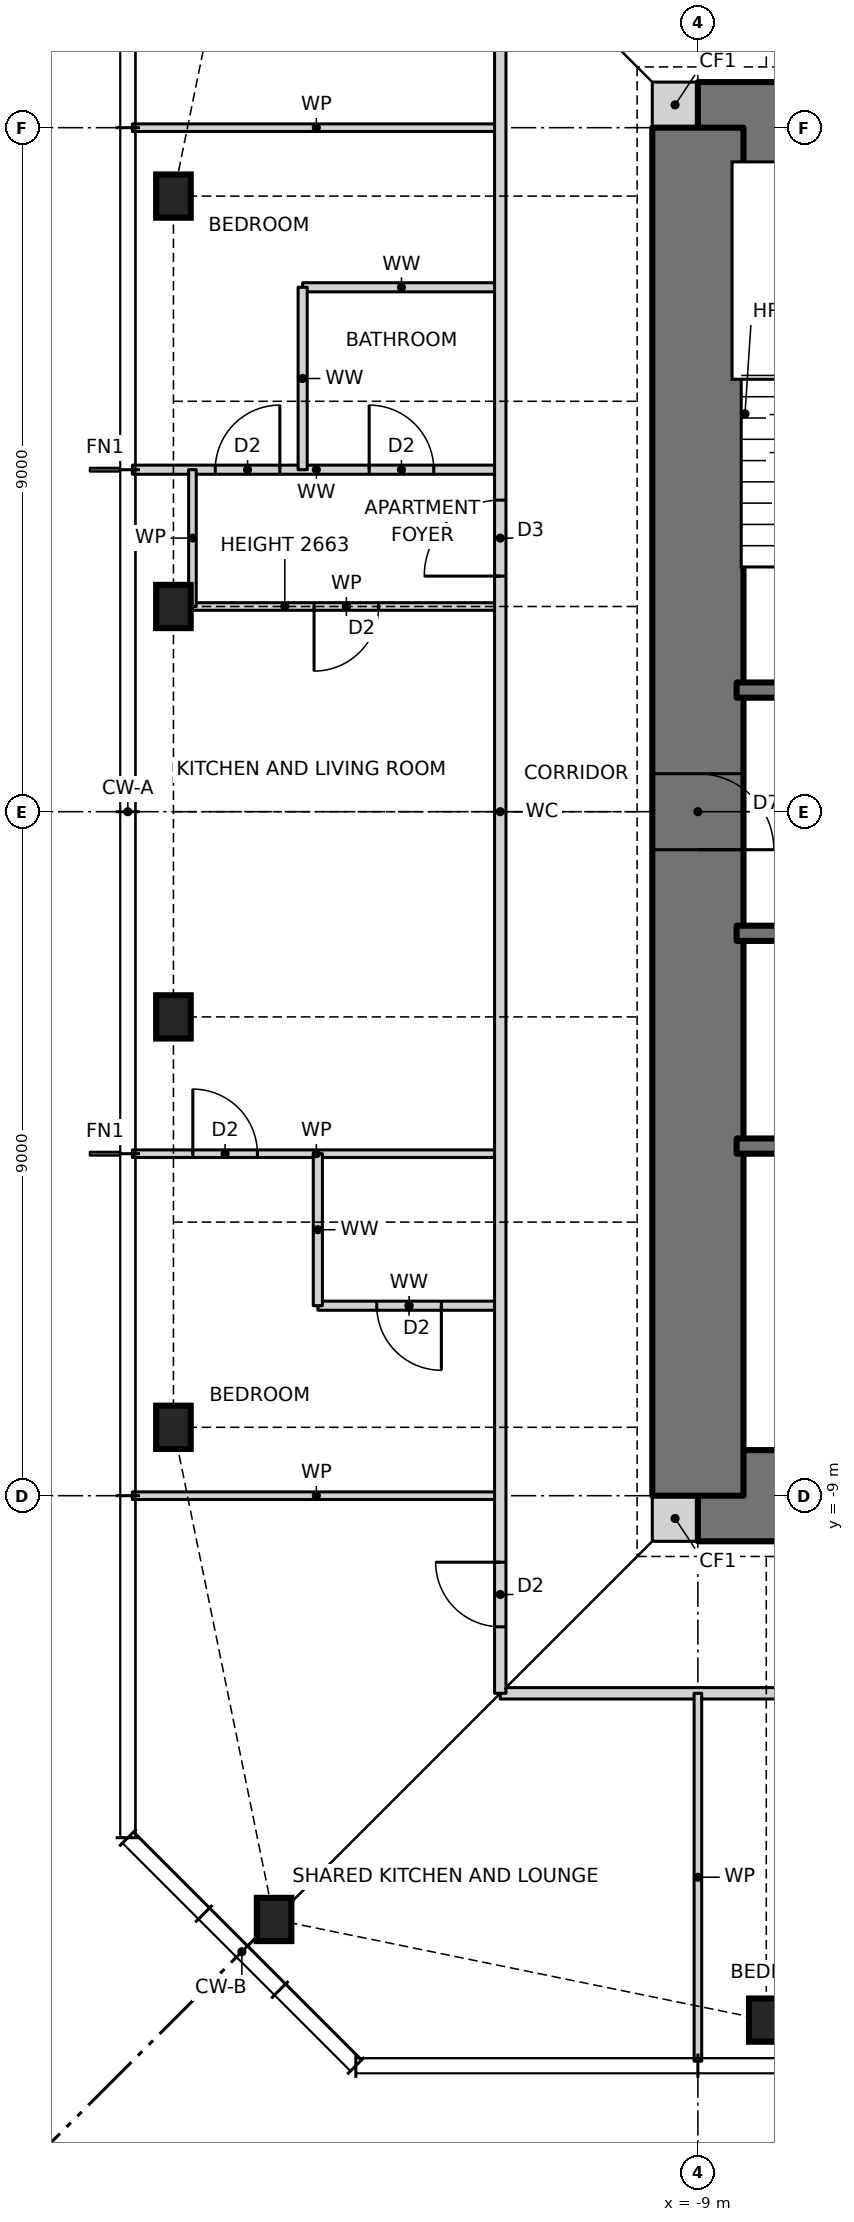
"""IFC4 building model, lengths in metres.
Left out: names, types, materials, properties, quantities, classifications, styles, units other than length and angle.
Written with IfcOpenShell. Run it as: python <this file> out.ifc"""

import sys

from ifc_helpers import new_model, si_unit, direction, frame, frame_2d, origin, origin_2d, place, context, subcontext, project, spatial, rectangle, i_section, extrude, element, fill, save


model = new_model("IFC4")
c1 = context("Model", 3, precision=1e-05, world=origin(), true_north=direction((0.0, 1.0)))
c2 = subcontext(c1, "Body", "Model", "MODEL_VIEW")
j1 = project(units=[si_unit("LENGTHUNIT", "METRE"), si_unit("PLANEANGLEUNIT", "RADIAN")], contexts=[c1])
p1 = place(None, origin())
s1 = spatial("IfcSite", under=j1, at=p1, CompositionType="ELEMENT")
p2 = place(p1, origin())
s2 = spatial("IfcBuilding", under=s1, at=p2, CompositionType="ELEMENT")
p3 = place(p2, frame((0.0, 0.0, 243.0)))
s3 = spatial("IfcBuildingStorey", under=s2, at=p3, CompositionType="ELEMENT", Elevation=243.0)
for number, where, z_axis, x_axis in (
    (1, (-14.576, -14.576, 0.0), (0.0, 0.0, 1.0), (1.0, 0.0, 0.0)),
    (2, (-8.1, -15.9, 0.0), (0.0, 0.0, 1.0), (1.0, 0.0, 0.0)),
    (3, (-15.9, 8.1, 0.0), (0.0, 0.0, 1.0), (1.0, 0.0, 0.0)),
    (4, (-15.9, 2.7, 0.0), (0.0, 0.0, 1.0), (1.0, 0.0, 0.0)),
    (5, (-15.9, -2.7, 0.0), (0.0, 0.0, 1.0), (1.0, 0.0, 0.0)),
    (6, (-15.9, -8.1, 0.0), (0.0, 0.0, 1.0), (1.0, 0.0, 0.0)),
):
    element("IfcColumn", number, at=place(p3, frame(where, z_axis=z_axis, x_axis=x_axis)), inside=s3, PredefinedType="COLUMN", context=c2, shape_type="SweptSolid", body=[
        extrude(i_section(OverallWidth=0.455, OverallDepth=0.569, WebThickness=0.078, FlangeThickness=0.125, at=origin_2d()), origin(), (0.0, 0.0, 1.0), 3.5),
    ])
for number, where, z_axis, x_axis in (
    (7, (-9.6, -9.3, 0.0), (0.0, 0.0, 1.0), (1.0, 0.0, 0.0)),
    (8, (-9.6, 9.3, 0.0), (0.0, 0.0, 1.0), (1.0, 0.0, 0.0)),
):
    element("IfcWall", number, at=place(p3, frame(where, z_axis=z_axis, x_axis=x_axis)), inside=s3, PredefinedType="SOLIDWALL", context=c2, shape_type="SweptSolid", body=[
        extrude(rectangle(XDim=0.6, YDim=0.6, at=frame_2d((0.3, 0.0))), origin(), (0.0, 0.0, 1.0), 3.5),
    ])
p4 = place(p3, frame((-9.0, -9.0, 0.0), z_axis=(0.0, 0.0, 1.0), x_axis=(1.0, 0.0, 0.0)))
e9 = element("IfcWall", 9, at=p4, inside=s3, PredefinedType="SHEAR", context=c2, shape_type="SweptSolid", body=[
    extrude(rectangle(XDim=18.0, YDim=1.2, at=frame_2d((9.0, 0.0))), origin(), (0.0, 0.0, 1.0), 3.5),
])
p5 = place(p4, frame((3.775, 0.0, 0.0)))
e10 = element("IfcOpeningElement", 10, at=p5, cuts=e9, PredefinedType="OPENING", context=c2, shape_type="SweptSolid", body=[
    extrude(rectangle(XDim=0.9, YDim=2.1, at=frame_2d((0.45, 1.05))), frame((0.0, 0.61, 0.0), z_axis=(0.0, -1.0, 0.0), x_axis=(1.0, 0.0, 0.0)), (0.0, 0.0, 1.0), 1.22),
])
p6 = place(p4, frame((10.625, 0.0, 0.0)))
e11 = element("IfcOpeningElement", 11, at=p6, cuts=e9, PredefinedType="OPENING", context=c2, shape_type="SweptSolid", body=[
    extrude(rectangle(XDim=0.9, YDim=2.1, at=frame_2d((0.45, 1.05))), frame((0.0, 0.61, 0.0), z_axis=(0.0, -1.0, 0.0), x_axis=(1.0, 0.0, 0.0)), (0.0, 0.0, 1.0), 1.22),
])
p7 = place(p3, frame((9.0, 9.0, 0.0), z_axis=(0.0, 0.0, 1.0), x_axis=(-1.0, 0.0, 0.0)))
e12 = element("IfcWall", 12, at=p7, inside=s3, PredefinedType="SHEAR", context=c2, shape_type="SweptSolid", body=[
    extrude(rectangle(XDim=18.0, YDim=1.2, at=frame_2d((9.0, 0.0))), origin(), (0.0, 0.0, 1.0), 3.5),
])
p8 = place(p7, frame((11.125, 0.0, 0.0)))
e13 = element("IfcOpeningElement", 13, at=p8, cuts=e12, PredefinedType="OPENING", context=c2, shape_type="SweptSolid", body=[
    extrude(rectangle(XDim=0.9, YDim=2.1, at=frame_2d((0.45, 1.05))), frame((0.0, 0.61, 0.0), z_axis=(0.0, -1.0, 0.0), x_axis=(1.0, 0.0, 0.0)), (0.0, 0.0, 1.0), 1.22),
])
p9 = place(p7, frame((4.275, 0.0, 0.0)))
e14 = element("IfcOpeningElement", 14, at=p9, cuts=e12, PredefinedType="OPENING", context=c2, shape_type="SweptSolid", body=[
    extrude(rectangle(XDim=0.9, YDim=2.1, at=frame_2d((0.45, 1.05))), frame((0.0, 0.61, 0.0), z_axis=(0.0, -1.0, 0.0), x_axis=(1.0, 0.0, 0.0)), (0.0, 0.0, 1.0), 1.22),
])
p10 = place(p3, frame((-9.0, 9.0, 0.0), z_axis=(0.0, 0.0, 1.0), x_axis=(0.0, -1.0, 0.0)))
e15 = element("IfcWall", 15, at=p10, inside=s3, PredefinedType="SHEAR", context=c2, shape_type="SweptSolid", body=[
    extrude(rectangle(XDim=18.0, YDim=1.2, at=frame_2d((9.0, 0.0))), origin(), (0.0, 0.0, 1.0), 3.5),
])
p11 = place(p10, frame((8.5, 0.0, 0.0)))
e16 = element("IfcOpeningElement", 16, at=p11, cuts=e15, PredefinedType="OPENING", context=c2, shape_type="SweptSolid", body=[
    extrude(rectangle(XDim=1.0, YDim=2.1, at=frame_2d((0.5, 1.05))), frame((0.0, 0.61, 0.0), z_axis=(0.0, -1.0, 0.0), x_axis=(1.0, 0.0, 0.0)), (0.0, 0.0, 1.0), 1.22),
])
p12 = place(p3, frame((-11.6, -11.6, 0.0), z_axis=(0.0, 0.0, 1.0), x_axis=(1.0, 0.0, 0.0)))
e17 = element("IfcWall", 17, at=p12, inside=s3, PredefinedType="PARTITIONING", context=c2, shape_type="SweptSolid", body=[
    extrude(rectangle(XDim=23.2, YDim=0.15, at=frame_2d((11.6, 0.0))), origin(), (0.0, 0.0, 1.0), 3.27),
])
p13 = place(p12, frame((7.5, 0.0, 0.0)))
e18 = element("IfcOpeningElement", 18, at=p13, cuts=e17, PredefinedType="OPENING", context=c2, shape_type="SweptSolid", body=[
    extrude(rectangle(XDim=1.0, YDim=2.1, at=frame_2d((0.5, 1.05))), frame((0.0, 0.085, 0.0), z_axis=(0.0, -1.0, 0.0), x_axis=(1.0, 0.0, 0.0)), (0.0, 0.0, 1.0), 0.17),
])
p14 = place(p12, frame((21.0, 0.0, 0.0)))
e19 = element("IfcOpeningElement", 19, at=p14, cuts=e17, PredefinedType="OPENING", context=c2, shape_type="SweptSolid", body=[
    extrude(rectangle(XDim=1.8, YDim=2.1, at=frame_2d((0.9, 1.05))), frame((0.0, 0.085, 0.0), z_axis=(0.0, -1.0, 0.0), x_axis=(1.0, 0.0, 0.0)), (0.0, 0.0, 1.0), 0.17),
])
p15 = place(p3, frame((-16.44, -9.0, 0.0), z_axis=(0.0, 0.0, 1.0), x_axis=(1.0, 0.0, 0.0)))
e20 = element("IfcWall", 20, at=p15, inside=s3, PredefinedType="PARTITIONING", context=c2, shape_type="SweptSolid", body=[
    extrude(rectangle(XDim=4.84, YDim=0.1, at=frame_2d((2.42, 0.0))), origin(), (0.0, 0.0, 1.0), 3.27),
])
p16 = place(p3, frame((-14.0, -6.5, 0.0), z_axis=(0.0, 0.0, 1.0), x_axis=(1.0, 0.0, 0.0)))
e21 = element("IfcWall", 21, at=p16, inside=s3, PredefinedType="PARTITIONING", context=c2, shape_type="SweptSolid", body=[
    extrude(rectangle(XDim=2.4, YDim=0.12, at=frame_2d((1.2, 0.0))), origin(), (0.0, 0.0, 1.0), 3.27),
])
p17 = place(p16, frame((0.775, 0.0, 0.0)))
e22 = element("IfcOpeningElement", 22, at=p17, cuts=e21, PredefinedType="OPENING", context=c2, shape_type="SweptSolid", body=[
    extrude(rectangle(XDim=0.85, YDim=2.1, at=frame_2d((0.425, 1.05))), frame((0.0, 0.07, 0.0), z_axis=(0.0, -1.0, 0.0), x_axis=(1.0, 0.0, 0.0)), (0.0, 0.0, 1.0), 0.14),
])
p18 = place(p3, frame((-16.44, -4.5, 0.0), z_axis=(0.0, 0.0, 1.0), x_axis=(1.0, 0.0, 0.0)))
e23 = element("IfcWall", 23, at=p18, inside=s3, PredefinedType="PARTITIONING", context=c2, shape_type="SweptSolid", body=[
    extrude(rectangle(XDim=4.84, YDim=0.1, at=frame_2d((2.42, 0.0))), origin(), (0.0, 0.0, 1.0), 3.27),
])
p19 = place(p18, frame((0.795, 0.0, 0.0)))
e24 = element("IfcOpeningElement", 24, at=p19, cuts=e23, PredefinedType="OPENING", context=c2, shape_type="SweptSolid", body=[
    extrude(rectangle(XDim=0.85, YDim=2.1, at=frame_2d((0.425, 1.05))), frame((0.0, 0.06, 0.0), z_axis=(0.0, -1.0, 0.0), x_axis=(1.0, 0.0, 0.0)), (0.0, 0.0, 1.0), 0.12),
])
p20 = place(p3, frame((-8.49, -4.4, 0.0), z_axis=(0.0, 0.0, 1.0), x_axis=(1.0, 0.0, 0.0)))
e25 = element("IfcWall", 25, at=p20, inside=s3, PredefinedType="SOLIDWALL", context=c2, shape_type="SweptSolid", body=[
    extrude(rectangle(XDim=13.64, YDim=0.2, at=frame_2d((6.82, 0.0))), origin(), (0.0, 0.0, 1.0), 3.5),
])
p21 = place(p3, frame((-8.49, -1.6, 0.0), z_axis=(0.0, 0.0, 1.0), x_axis=(1.0, 0.0, 0.0)))
e26 = element("IfcWall", 26, at=p21, inside=s3, PredefinedType="SOLIDWALL", context=c2, shape_type="SweptSolid", body=[
    extrude(rectangle(XDim=16.98, YDim=0.2, at=frame_2d((8.49, 0.0))), origin(), (0.0, 0.0, 1.0), 3.5),
])
p22 = place(p21, frame((14.81, 0.0, 0.0)))
e27 = element("IfcOpeningElement", 27, at=p22, cuts=e26, PredefinedType="OPENING", context=c2, shape_type="SweptSolid", body=[
    extrude(rectangle(XDim=1.0, YDim=2.1, at=frame_2d((0.5, 1.05))), frame((0.0, 0.11, 0.0), z_axis=(0.0, -1.0, 0.0), x_axis=(1.0, 0.0, 0.0)), (0.0, 0.0, 1.0), 0.22),
])
p23 = place(p21, frame((1.232, 0.0, 0.0)))
e28 = element("IfcOpeningElement", 28, at=p23, cuts=e26, PredefinedType="OPENING", context=c2, shape_type="SweptSolid", body=[
    extrude(rectangle(XDim=0.9, YDim=2.1, at=frame_2d((0.45, 1.05))), frame((0.0, 0.11, 0.0), z_axis=(0.0, -1.0, 0.0), x_axis=(1.0, 0.0, 0.0)), (0.0, 0.0, 1.0), 0.22),
])
p24 = place(p21, frame((4.627, 0.0, 0.0)))
e29 = element("IfcOpeningElement", 29, at=p24, cuts=e26, PredefinedType="OPENING", context=c2, shape_type="SweptSolid", body=[
    extrude(rectangle(XDim=0.9, YDim=2.1, at=frame_2d((0.45, 1.05))), frame((0.0, 0.11, 0.0), z_axis=(0.0, -1.0, 0.0), x_axis=(1.0, 0.0, 0.0)), (0.0, 0.0, 1.0), 0.22),
])
p25 = place(p21, frame((8.052, 0.0, 0.0)))
e30 = element("IfcOpeningElement", 30, at=p25, cuts=e26, PredefinedType="OPENING", context=c2, shape_type="SweptSolid", body=[
    extrude(rectangle(XDim=0.9, YDim=2.1, at=frame_2d((0.45, 1.05))), frame((0.0, 0.11, 0.0), z_axis=(0.0, -1.0, 0.0), x_axis=(1.0, 0.0, 0.0)), (0.0, 0.0, 1.0), 0.22),
])
p26 = place(p21, frame((11.478, 0.0, 0.0)))
e31 = element("IfcOpeningElement", 31, at=p26, cuts=e26, PredefinedType="OPENING", context=c2, shape_type="SweptSolid", body=[
    extrude(rectangle(XDim=0.9, YDim=2.1, at=frame_2d((0.45, 1.05))), frame((0.0, 0.11, 0.0), z_axis=(0.0, -1.0, 0.0), x_axis=(1.0, 0.0, 0.0)), (0.0, 0.0, 1.0), 0.22),
])
p27 = place(p3, frame((-8.49, 1.6, 0.0), z_axis=(0.0, 0.0, 1.0), x_axis=(1.0, 0.0, 0.0)))
e32 = element("IfcWall", 32, at=p27, inside=s3, PredefinedType="SOLIDWALL", context=c2, shape_type="SweptSolid", body=[
    extrude(rectangle(XDim=16.98, YDim=0.2, at=frame_2d((8.49, 0.0))), origin(), (0.0, 0.0, 1.0), 3.5),
])
p28 = place(p27, frame((1.17, 0.0, 0.0)))
e33 = element("IfcOpeningElement", 33, at=p28, cuts=e32, PredefinedType="OPENING", context=c2, shape_type="SweptSolid", body=[
    extrude(rectangle(XDim=1.0, YDim=2.1, at=frame_2d((0.5, 1.05))), frame((0.0, 0.11, 0.0), z_axis=(0.0, -1.0, 0.0), x_axis=(1.0, 0.0, 0.0)), (0.0, 0.0, 1.0), 0.22),
])
p29 = place(p27, frame((4.606, 0.0, 0.0)))
e34 = element("IfcOpeningElement", 34, at=p29, cuts=e32, PredefinedType="OPENING", context=c2, shape_type="SweptSolid", body=[
    extrude(rectangle(XDim=0.9, YDim=2.1, at=frame_2d((0.45, 1.05))), frame((0.0, 0.11, 0.0), z_axis=(0.0, -1.0, 0.0), x_axis=(1.0, 0.0, 0.0)), (0.0, 0.0, 1.0), 0.22),
])
p30 = place(p27, frame((8.04, 0.0, 0.0)))
e35 = element("IfcOpeningElement", 35, at=p30, cuts=e32, PredefinedType="OPENING", context=c2, shape_type="SweptSolid", body=[
    extrude(rectangle(XDim=0.9, YDim=2.1, at=frame_2d((0.45, 1.05))), frame((0.0, 0.11, 0.0), z_axis=(0.0, -1.0, 0.0), x_axis=(1.0, 0.0, 0.0)), (0.0, 0.0, 1.0), 0.22),
])
p31 = place(p27, frame((11.374, 0.0, 0.0)))
e36 = element("IfcOpeningElement", 36, at=p31, cuts=e32, PredefinedType="OPENING", context=c2, shape_type="SweptSolid", body=[
    extrude(rectangle(XDim=1.1, YDim=2.1, at=frame_2d((0.55, 1.05))), frame((0.0, 0.11, 0.0), z_axis=(0.0, -1.0, 0.0), x_axis=(1.0, 0.0, 0.0)), (0.0, 0.0, 1.0), 0.22),
])
p32 = place(p27, frame((14.66, 0.0, 0.0)))
e37 = element("IfcOpeningElement", 37, at=p32, cuts=e32, PredefinedType="OPENING", context=c2, shape_type="SweptSolid", body=[
    extrude(rectangle(XDim=1.3, YDim=2.1, at=frame_2d((0.65, 1.05))), frame((0.0, 0.11, 0.0), z_axis=(0.0, -1.0, 0.0), x_axis=(1.0, 0.0, 0.0)), (0.0, 0.0, 1.0), 0.22),
])
p33 = place(p3, frame((-15.65, 2.7, 0.0), z_axis=(0.0, 0.0, 1.0), x_axis=(1.0, 0.0, 0.0)))
e38 = element("IfcWall", 38, at=p33, inside=s3, PredefinedType="PARTITIONING", context=c2, shape_type="SweptSolid", body=[
    extrude(rectangle(XDim=4.05, YDim=0.1, at=frame_2d((2.025, 0.0))), origin(), (0.0, 0.0, 1.0), 2.663),
])
p34 = place(p33, frame((1.6, 0.0, 0.0)))
e39 = element("IfcOpeningElement", 39, at=p34, cuts=e38, PredefinedType="OPENING", context=c2, shape_type="SweptSolid", body=[
    extrude(rectangle(XDim=0.85, YDim=2.1, at=frame_2d((0.425, 1.05))), frame((0.0, 0.06, 0.0), z_axis=(0.0, -1.0, 0.0), x_axis=(1.0, 0.0, 0.0)), (0.0, 0.0, 1.0), 0.12),
])
p35 = place(p3, frame((-16.44, 4.5, 0.0), z_axis=(0.0, 0.0, 1.0), x_axis=(1.0, 0.0, 0.0)))
e40 = element("IfcWall", 40, at=p35, inside=s3, PredefinedType="PARTITIONING", context=c2, shape_type="SweptSolid", body=[
    extrude(rectangle(XDim=4.84, YDim=0.12, at=frame_2d((2.42, 0.0))), origin(), (0.0, 0.0, 1.0), 3.27),
])
p36 = place(p35, frame((1.09, 0.0, 0.0)))
e41 = element("IfcOpeningElement", 41, at=p36, cuts=e40, PredefinedType="OPENING", context=c2, shape_type="SweptSolid", body=[
    extrude(rectangle(XDim=0.85, YDim=2.1, at=frame_2d((0.425, 1.05))), frame((0.0, 0.07, 0.0), z_axis=(0.0, -1.0, 0.0), x_axis=(1.0, 0.0, 0.0)), (0.0, 0.0, 1.0), 0.14),
])
p37 = place(p35, frame((3.115, 0.0, 0.0)))
e42 = element("IfcOpeningElement", 42, at=p37, cuts=e40, PredefinedType="OPENING", context=c2, shape_type="SweptSolid", body=[
    extrude(rectangle(XDim=0.85, YDim=2.1, at=frame_2d((0.425, 1.05))), frame((0.0, 0.07, 0.0), z_axis=(0.0, -1.0, 0.0), x_axis=(1.0, 0.0, 0.0)), (0.0, 0.0, 1.0), 0.14),
])
p38 = place(p3, frame((-14.2, 6.9, 0.0), z_axis=(0.0, 0.0, 1.0), x_axis=(1.0, 0.0, 0.0)))
e43 = element("IfcWall", 43, at=p38, inside=s3, PredefinedType="PARTITIONING", context=c2, shape_type="SweptSolid", body=[
    extrude(rectangle(XDim=2.6, YDim=0.12, at=frame_2d((1.3, 0.0))), origin(), (0.0, 0.0, 1.0), 3.27),
])
for number, where, z_axis, x_axis in (
    (44, (-16.44, 9.0, 0.0), (0.0, 0.0, 1.0), (1.0, 0.0, 0.0)),
    (45, (-9.0, -16.44, 0.0), (0.0, 0.0, 1.0), (0.0, 1.0, 0.0)),
):
    element("IfcWall", number, at=place(p3, frame(where, z_axis=z_axis, x_axis=x_axis)), inside=s3, PredefinedType="PARTITIONING", context=c2, shape_type="SweptSolid", body=[
        extrude(rectangle(XDim=4.84, YDim=0.1, at=frame_2d((2.42, 0.0))), origin(), (0.0, 0.0, 1.0), 3.27),
    ])
p39 = place(p3, frame((-11.6, -11.6, 0.0), z_axis=(0.0, 0.0, 1.0), x_axis=(0.0, 1.0, 0.0)))
e46 = element("IfcWall", 46, at=p39, inside=s3, PredefinedType="PARTITIONING", context=c2, shape_type="SweptSolid", body=[
    extrude(rectangle(XDim=23.2, YDim=0.15, at=frame_2d((11.6, 0.0))), origin(), (0.0, 0.0, 1.0), 3.27),
])
p40 = place(p39, frame((14.7, 0.0, 0.0)))
e47 = element("IfcOpeningElement", 47, at=p40, cuts=e46, PredefinedType="OPENING", context=c2, shape_type="SweptSolid", body=[
    extrude(rectangle(XDim=1.0, YDim=2.1, at=frame_2d((0.5, 1.05))), frame((0.0, 0.085, 0.0), z_axis=(0.0, -1.0, 0.0), x_axis=(1.0, 0.0, 0.0)), (0.0, 0.0, 1.0), 0.17),
])
p41 = place(p39, frame((0.875, 0.0, 0.0)))
e48 = element("IfcOpeningElement", 48, at=p41, cuts=e46, PredefinedType="OPENING", context=c2, shape_type="SweptSolid", body=[
    extrude(rectangle(XDim=0.85, YDim=2.1, at=frame_2d((0.425, 1.05))), frame((0.0, 0.085, 0.0), z_axis=(0.0, -1.0, 0.0), x_axis=(1.0, 0.0, 0.0)), (0.0, 0.0, 1.0), 0.17),
])
p42 = place(p3, frame((-14.0, -6.5, 0.0), z_axis=(0.0, 0.0, 1.0), x_axis=(0.0, 1.0, 0.0)))
e49 = element("IfcWall", 49, at=p42, inside=s3, PredefinedType="PARTITIONING", context=c2, shape_type="SweptSolid", body=[
    extrude(rectangle(XDim=2.0, YDim=0.12, at=frame_2d((1.0, 0.0))), origin(), (0.0, 0.0, 1.0), 3.27),
])
p43 = place(p3, frame((-14.2, 4.5, 0.0), z_axis=(0.0, 0.0, 1.0), x_axis=(0.0, 1.0, 0.0)))
e50 = element("IfcWall", 50, at=p43, inside=s3, PredefinedType="PARTITIONING", context=c2, shape_type="SweptSolid", body=[
    extrude(rectangle(XDim=2.4, YDim=0.12, at=frame_2d((1.2, 0.0))), origin(), (0.0, 0.0, 1.0), 3.27),
])
p44 = place(p3, frame((-15.65, 2.7, 0.0), z_axis=(0.0, 0.0, 1.0), x_axis=(0.0, 1.0, 0.0)))
e51 = element("IfcWall", 51, at=p44, inside=s3, PredefinedType="PARTITIONING", context=c2, shape_type="SweptSolid", body=[
    extrude(rectangle(XDim=1.8, YDim=0.1, at=frame_2d((0.9, 0.0))), origin(), (0.0, 0.0, 1.0), 3.27),
])
p45 = place(p40, origin())
e52 = element("IfcDoor", 52, at=p45, inside=s3, OperationType="SINGLE_SWING_LEFT", PredefinedType="DOOR", context=c2, shape_type="SweptSolid", body=[
    extrude(rectangle(XDim=1.0, YDim=2.1, at=frame_2d((0.5, 1.05))), frame((0.0, 0.025, 0.0), z_axis=(0.0, -1.0, 0.0), x_axis=(1.0, 0.0, 0.0)), (0.0, 0.0, 1.0), 0.05),
])
fill(e47, e52)
p46 = place(p34, frame((0.85, 0.0, 0.0), z_axis=(0.0, 0.0, 1.0), x_axis=(-1.0, 0.0, 0.0)))
e53 = element("IfcDoor", 53, at=p46, inside=s3, OperationType="SINGLE_SWING_RIGHT", PredefinedType="DOOR", context=c2, shape_type="SweptSolid", body=[
    extrude(rectangle(XDim=0.85, YDim=2.1, at=frame_2d((0.425, 1.05))), frame((0.0, 0.025, 0.0), z_axis=(0.0, -1.0, 0.0), x_axis=(1.0, 0.0, 0.0)), (0.0, 0.0, 1.0), 0.05),
])
fill(e39, e53)
p47 = place(p36, origin())
e54 = element("IfcDoor", 54, at=p47, inside=s3, OperationType="SINGLE_SWING_RIGHT", PredefinedType="DOOR", context=c2, shape_type="SweptSolid", body=[
    extrude(rectangle(XDim=0.85, YDim=2.1, at=frame_2d((0.425, 1.05))), frame((0.0, 0.025, 0.0), z_axis=(0.0, -1.0, 0.0), x_axis=(1.0, 0.0, 0.0)), (0.0, 0.0, 1.0), 0.05),
])
fill(e41, e54)
p48 = place(p37, origin())
e55 = element("IfcDoor", 55, at=p48, inside=s3, OperationType="SINGLE_SWING_LEFT", PredefinedType="DOOR", context=c2, shape_type="SweptSolid", body=[
    extrude(rectangle(XDim=0.85, YDim=2.1, at=frame_2d((0.425, 1.05))), frame((0.0, 0.025, 0.0), z_axis=(0.0, -1.0, 0.0), x_axis=(1.0, 0.0, 0.0)), (0.0, 0.0, 1.0), 0.05),
])
fill(e42, e55)
p49 = place(p19, origin())
e56 = element("IfcDoor", 56, at=p49, inside=s3, OperationType="SINGLE_SWING_LEFT", PredefinedType="DOOR", context=c2, shape_type="SweptSolid", body=[
    extrude(rectangle(XDim=0.85, YDim=2.1, at=frame_2d((0.425, 1.05))), frame((0.0, 0.025, 0.0), z_axis=(0.0, -1.0, 0.0), x_axis=(1.0, 0.0, 0.0)), (0.0, 0.0, 1.0), 0.05),
])
fill(e24, e56)
p50 = place(p17, frame((0.85, 0.0, 0.0), z_axis=(0.0, 0.0, 1.0), x_axis=(-1.0, 0.0, 0.0)))
e57 = element("IfcDoor", 57, at=p50, inside=s3, OperationType="SINGLE_SWING_LEFT", PredefinedType="DOOR", context=c2, shape_type="SweptSolid", body=[
    extrude(rectangle(XDim=0.85, YDim=2.1, at=frame_2d((0.425, 1.05))), frame((0.0, 0.025, 0.0), z_axis=(0.0, -1.0, 0.0), x_axis=(1.0, 0.0, 0.0)), (0.0, 0.0, 1.0), 0.05),
])
fill(e22, e57)
p51 = place(p41, origin())
e58 = element("IfcDoor", 58, at=p51, inside=s3, OperationType="SINGLE_SWING_RIGHT", PredefinedType="DOOR", context=c2, shape_type="SweptSolid", body=[
    extrude(rectangle(XDim=0.85, YDim=2.1, at=frame_2d((0.425, 1.05))), frame((0.0, 0.025, 0.0), z_axis=(0.0, -1.0, 0.0), x_axis=(1.0, 0.0, 0.0)), (0.0, 0.0, 1.0), 0.05),
])
fill(e48, e58)
p52 = place(p11, origin())
e59 = element("IfcDoor", 59, at=p52, inside=s3, OperationType="SINGLE_SWING_RIGHT", PredefinedType="DOOR", context=c2, shape_type="SweptSolid", body=[
    extrude(rectangle(XDim=1.0, YDim=2.1, at=frame_2d((0.5, 1.05))), frame((0.0, 0.025, 0.0), z_axis=(0.0, -1.0, 0.0), x_axis=(1.0, 0.0, 0.0)), (0.0, 0.0, 1.0), 0.05),
])
fill(e16, e59)
save(model, sys.argv[1])
